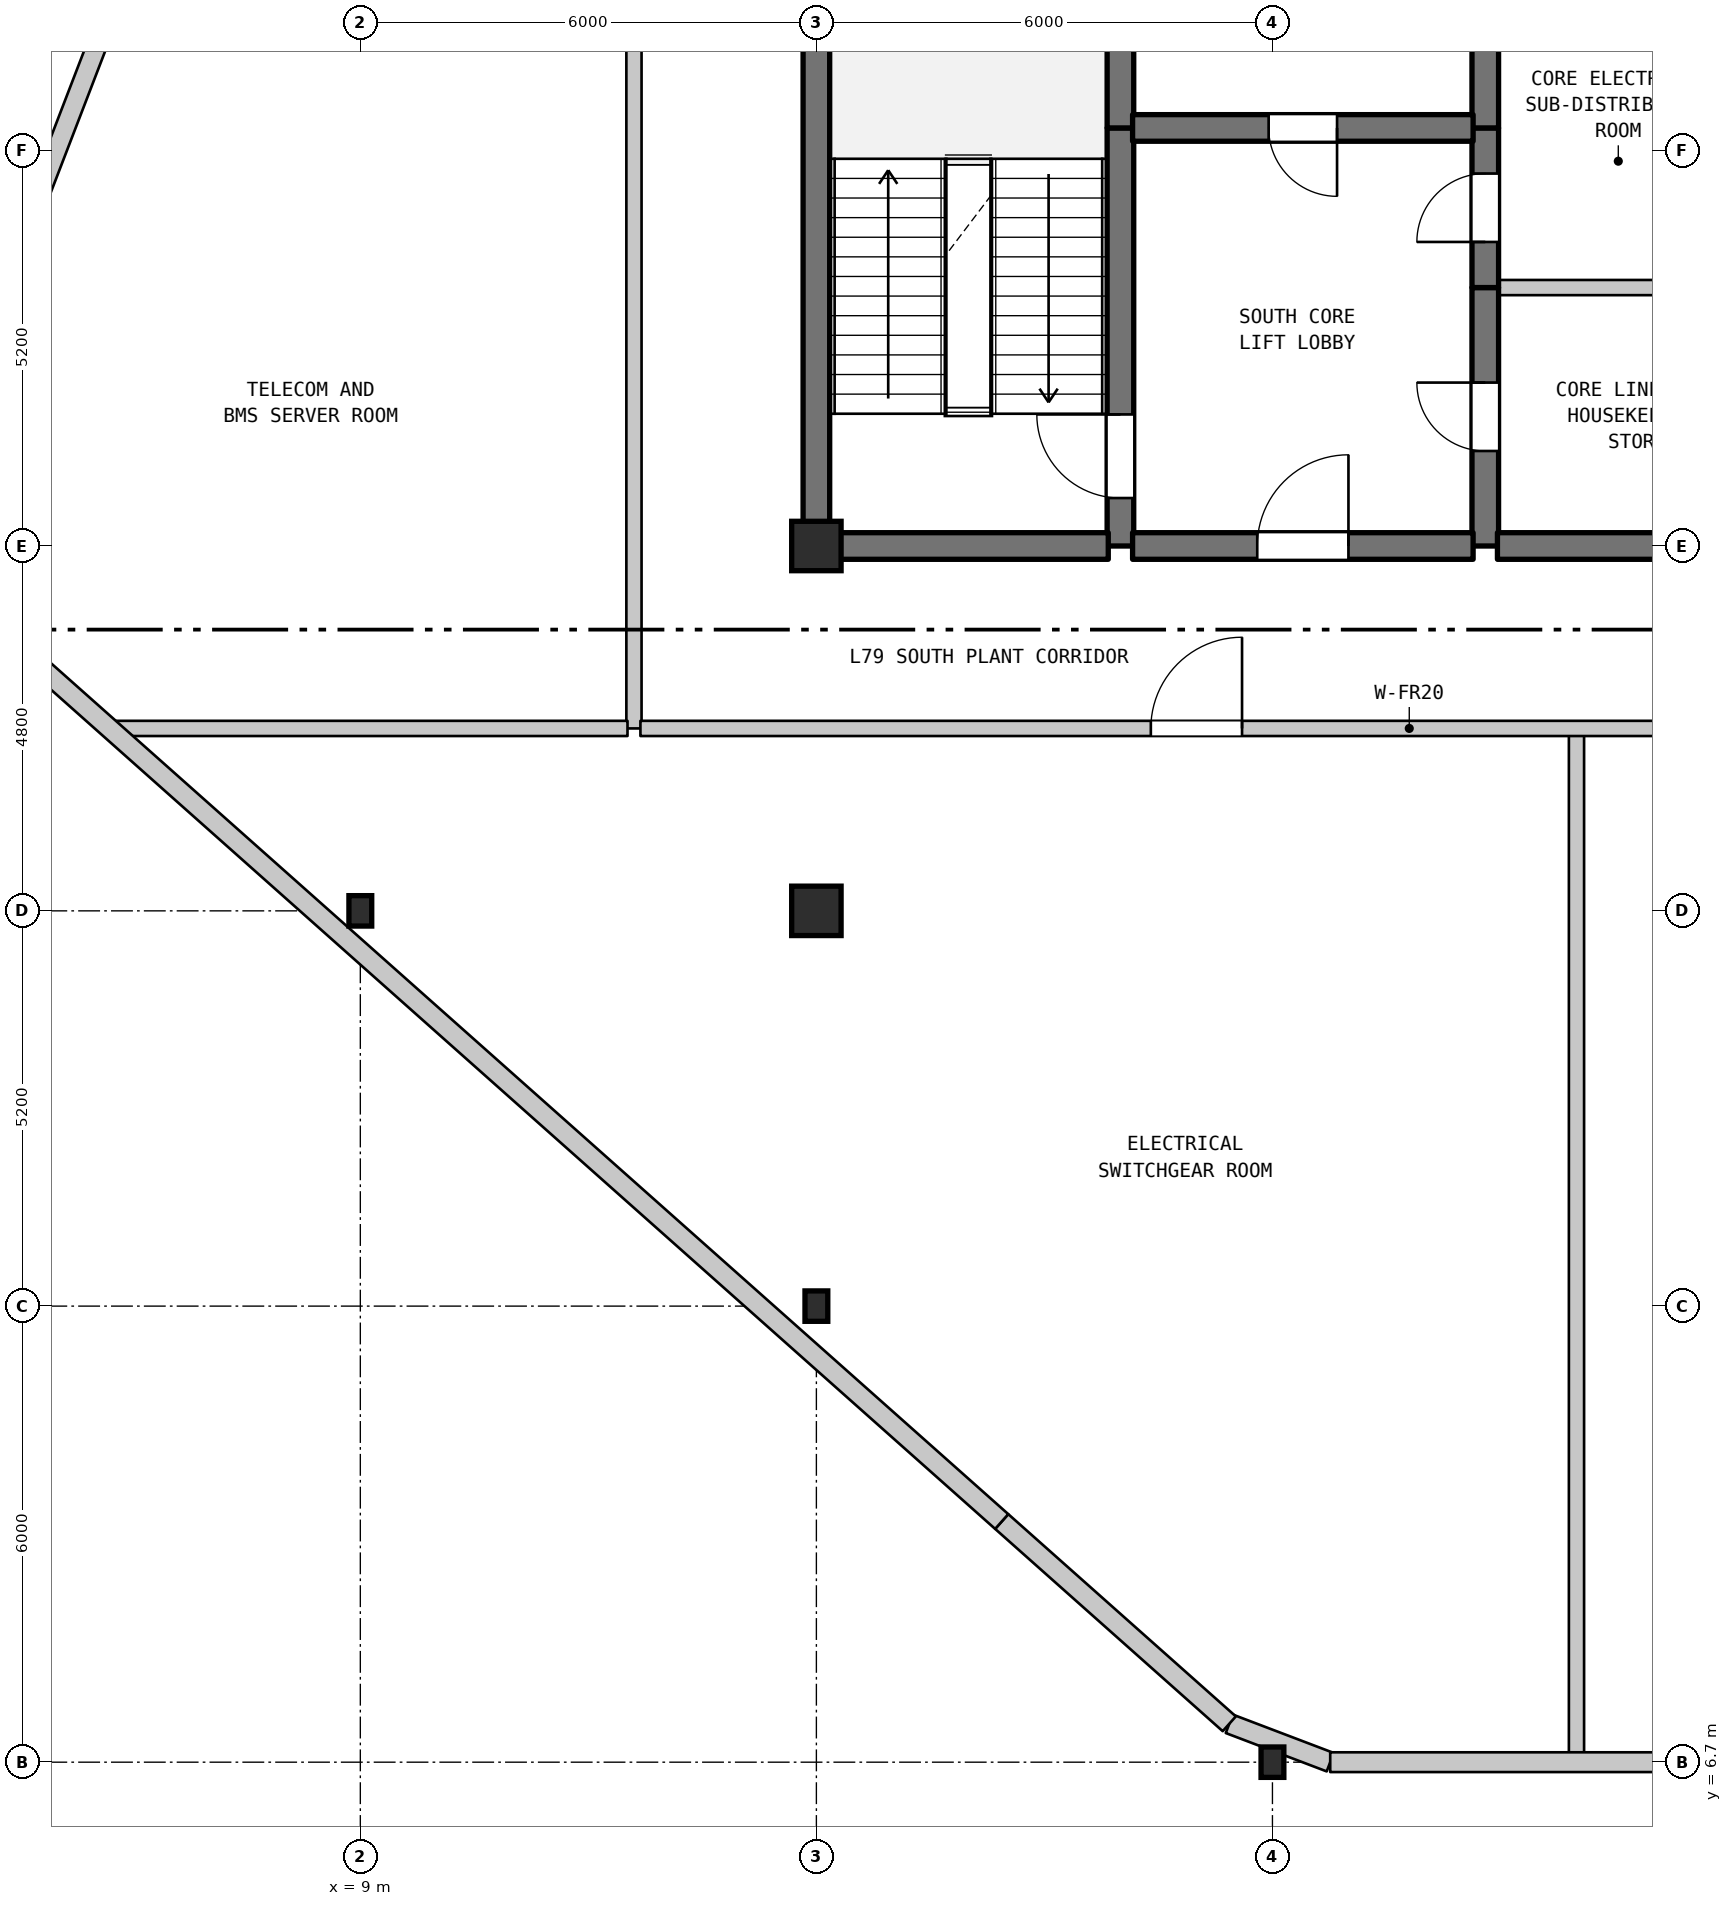
"""IFC4 building model, lengths in metres.
Left out: names, types, materials, properties, quantities, classifications, styles, units other than length and angle.
Written with IfcOpenShell. Run it as: python <this file> out.ifc"""

import sys

from ifc_helpers import new_model, si_unit, direction, frame, frame_2d, origin, origin_2d, place, context, subcontext, project, spatial, rectangle, i_section, extrude, element, fill, save


model = new_model("IFC4")
c1 = context("Model", 3, precision=1e-05, world=origin(), true_north=direction((0.0, 1.0)))
c2 = subcontext(c1, "Body", "Model", "MODEL_VIEW")
j1 = project(units=[si_unit("LENGTHUNIT", "METRE"), si_unit("PLANEANGLEUNIT", "RADIAN")], contexts=[c1])
p1 = place(None, origin())
s1 = spatial("IfcSite", under=j1, at=p1, CompositionType="ELEMENT")
p2 = place(p1, origin())
s2 = spatial("IfcBuilding", under=s1, at=p2, CompositionType="ELEMENT")
p3 = place(p2, frame((0.0, 0.0, 314.7)))
s3 = spatial("IfcBuildingStorey", under=s2, at=p3, CompositionType="ELEMENT", Elevation=314.7)
for number, where, z_axis, x_axis in (
    (1, (9.0, 17.9, 0.0), (0.0, 0.0, 1.0), (1.0, 0.0, 0.0)),
    (2, (15.0, 12.7, 0.0), (0.0, 0.0, 1.0), (1.0, 0.0, 0.0)),
):
    element("IfcColumn", number, at=place(p3, frame(where, z_axis=z_axis, x_axis=x_axis)), inside=s3, PredefinedType="COLUMN", context=c2, shape_type="SweptSolid", body=[
        extrude(i_section(OverallWidth=0.3, OverallDepth=0.4, WebThickness=0.013, FlangeThickness=0.024, FilletRadius=0.027, at=origin_2d()), origin(), (0.0, 0.0, 1.0), 5.3),
    ])
for number, where, z_axis, x_axis in (
    (3, (15.0, 17.9, 0.0), (0.0, 0.0, 1.0), (1.0, 0.0, 0.0)),
    (4, (15.0, 22.7, 0.0), (0.0, 0.0, 1.0), (1.0, 0.0, 0.0)),
):
    element("IfcColumn", number, at=place(p3, frame(where, z_axis=z_axis, x_axis=x_axis)), inside=s3, PredefinedType="COLUMN", context=c2, shape_type="SweptSolid", body=[
        extrude(rectangle(XDim=0.65, YDim=0.65, at=origin_2d()), origin(), (0.0, 0.0, 1.0), 5.3),
    ])
p4 = place(p3, frame((21.0, 6.7, 0.0), z_axis=(0.0, 0.0, 1.0), x_axis=(1.0, 0.0, 0.0)))
e5 = element("IfcColumn", 5, at=p4, inside=s3, PredefinedType="COLUMN", context=c2, shape_type="SweptSolid", body=[
    extrude(i_section(OverallWidth=0.3, OverallDepth=0.4, WebThickness=0.013, FlangeThickness=0.024, FilletRadius=0.027, at=origin_2d()), origin(), (0.0, 0.0, 1.0), 5.3),
])
p5 = place(p3, frame((3.497, 23.993, 0.0), z_axis=(0.0, 0.0, 1.0), x_axis=(0.358990281293, 0.93334129767, 0.0)))
e6 = element("IfcWall", 6, at=p5, inside=s3, PredefinedType="STANDARD", context=c2, shape_type="SweptSolid", body=[
    extrude(rectangle(XDim=30.669, YDim=0.26, at=frame_2d((15.335, 0.0))), origin(), (0.0, 0.0, 1.0), 4.99),
])
p6 = place(p3, frame((21.76, 6.7, 0.0), z_axis=(0.0, 0.0, 1.0), x_axis=(-0.934680848086, 0.355487991671, 0.0)))
e7 = element("IfcWall", 7, at=p6, inside=s3, PredefinedType="STANDARD", context=c2, shape_type="SweptSolid", body=[
    extrude(rectangle(XDim=1.421, YDim=0.26, at=frame_2d((0.71, 0.0))), origin(), (0.0, 0.0, 1.0), 4.99),
])
p7 = place(p3, frame((20.432, 7.205, 0.0), z_axis=(0.0, 0.0, 1.0), x_axis=(-0.747395867011, 0.664378971654, 0.0)))
e8 = element("IfcWall", 8, at=p7, inside=s3, PredefinedType="STANDARD", context=c2, shape_type="SweptSolid", body=[
    extrude(rectangle(XDim=4.005, YDim=0.26, at=frame_2d((2.003, 0.0))), origin(), (0.0, 0.0, 1.0), 4.65),
])
p8 = place(p3, frame((12.6, 20.3, 0.0), z_axis=(0.0, 0.0, 1.0), x_axis=(0.0, 1.0, 0.0)))
e9 = element("IfcWall", 9, at=p8, inside=s3, PredefinedType="STANDARD", context=c2, shape_type="SweptSolid", body=[
    extrude(rectangle(XDim=20.0, YDim=0.2, at=frame_2d((10.0, 0.0))), origin(), (0.0, 0.0, 1.0), 4.99),
])
p9 = place(p8, frame((13.175, 0.0, 0.0)))
e10 = element("IfcOpeningElement", 10, at=p9, cuts=e9, PredefinedType="OPENING", context=c2, shape_type="SweptSolid", body=[
    extrude(rectangle(XDim=1.2, YDim=2.2, at=frame_2d((0.6, 1.1))), frame((0.0, 0.11, 0.0), z_axis=(0.0, -1.0, 0.0), x_axis=(1.0, 0.0, 0.0)), (0.0, 0.0, 1.0), 0.22),
])
p10 = place(p3, frame((15.0, 22.7, 0.0), z_axis=(0.0, 0.0, 1.0), x_axis=(0.0, 1.0, 0.0)))
e11 = element("IfcWall", 11, at=p10, inside=s3, PredefinedType="SHEAR", context=c2, shape_type="SweptSolid", body=[
    extrude(rectangle(XDim=6.8, YDim=0.35, at=frame_2d((3.4, 0.0))), origin(), (0.0, 0.0, 1.0), 4.99),
])
p11 = place(p3, frame((19.0, 22.7, 0.0), z_axis=(0.0, 0.0, 1.0), x_axis=(0.0, 1.0, 0.0)))
e12 = element("IfcWall", 12, at=p11, inside=s3, PredefinedType="SHEAR", context=c2, shape_type="SweptSolid", body=[
    extrude(rectangle(XDim=5.5, YDim=0.35, at=frame_2d((2.75, 0.0))), origin(), (0.0, 0.0, 1.0), 4.99),
])
p12 = place(p11, frame((0.631, 0.0, 0.0)))
e13 = element("IfcOpeningElement", 13, at=p12, cuts=e12, PredefinedType="OPENING", context=c2, shape_type="SweptSolid", body=[
    extrude(rectangle(XDim=1.1, YDim=2.15, at=frame_2d((0.55, 1.075))), frame((0.0, 0.185, 0.0), z_axis=(0.0, -1.0, 0.0), x_axis=(1.0, 0.0, 0.0)), (0.0, 0.0, 1.0), 0.37),
])
p13 = place(p3, frame((19.0, 28.2, 0.0), z_axis=(0.0, 0.0, 1.0), x_axis=(0.0, 1.0, 0.0)))
e14 = element("IfcWall", 14, at=p13, inside=s3, PredefinedType="SHEAR", context=c2, shape_type="SweptSolid", body=[
    extrude(rectangle(XDim=1.3, YDim=0.35, at=frame_2d((0.65, 0.0))), origin(), (0.0, 0.0, 1.0), 4.99),
])
p14 = place(p3, frame((23.8, 22.7, 0.0), z_axis=(0.0, 0.0, 1.0), x_axis=(0.0, 1.0, 0.0)))
e15 = element("IfcWall", 15, at=p14, inside=s3, PredefinedType="SHEAR", context=c2, shape_type="SweptSolid", body=[
    extrude(rectangle(XDim=3.4, YDim=0.35, at=frame_2d((1.7, 0.0))), origin(), (0.0, 0.0, 1.0), 4.99),
])
p15 = place(p14, frame((1.25, 0.0, 0.0)))
e16 = element("IfcOpeningElement", 16, at=p15, cuts=e15, PredefinedType="OPENING", context=c2, shape_type="SweptSolid", body=[
    extrude(rectangle(XDim=0.9, YDim=2.15, at=frame_2d((0.45, 1.075))), frame((0.0, 0.185, 0.0), z_axis=(0.0, -1.0, 0.0), x_axis=(1.0, 0.0, 0.0)), (0.0, 0.0, 1.0), 0.37),
])
p16 = place(p3, frame((23.8, 26.1, 0.0), z_axis=(0.0, 0.0, 1.0), x_axis=(0.0, 1.0, 0.0)))
e17 = element("IfcWall", 17, at=p16, inside=s3, PredefinedType="SHEAR", context=c2, shape_type="SweptSolid", body=[
    extrude(rectangle(XDim=2.1, YDim=0.35, at=frame_2d((1.05, 0.0))), origin(), (0.0, 0.0, 1.0), 4.99),
])
p17 = place(p16, frame((0.6, 0.0, 0.0)))
e18 = element("IfcOpeningElement", 18, at=p17, cuts=e17, PredefinedType="OPENING", context=c2, shape_type="SweptSolid", body=[
    extrude(rectangle(XDim=0.9, YDim=2.15, at=frame_2d((0.45, 1.075))), frame((0.0, 0.185, 0.0), z_axis=(0.0, -1.0, 0.0), x_axis=(1.0, 0.0, 0.0)), (0.0, 0.0, 1.0), 0.37),
])
p18 = place(p3, frame((23.8, 28.2, 0.0), z_axis=(0.0, 0.0, 1.0), x_axis=(0.0, 1.0, 0.0)))
e19 = element("IfcWall", 19, at=p18, inside=s3, PredefinedType="SHEAR", context=c2, shape_type="SweptSolid", body=[
    extrude(rectangle(XDim=2.6, YDim=0.35, at=frame_2d((1.3, 0.0))), origin(), (0.0, 0.0, 1.0), 4.99),
])
p19 = place(p3, frame((25.0, 6.71, 0.0), z_axis=(0.0, 0.0, 1.0), x_axis=(0.0, 1.0, 0.0)))
e20 = element("IfcWall", 20, at=p19, inside=s3, PredefinedType="STANDARD", context=c2, shape_type="SweptSolid", body=[
    extrude(rectangle(XDim=13.59, YDim=0.2, at=frame_2d((6.795, 0.0))), origin(), (0.0, 0.0, 1.0), 4.99),
])
p20 = place(p3, frame((5.71, 20.3, 0.0), z_axis=(0.0, 0.0, 1.0), x_axis=(1.0, 0.0, 0.0)))
e21 = element("IfcWall", 21, at=p20, inside=s3, PredefinedType="STANDARD", context=c2, shape_type="SweptSolid", body=[
    extrude(rectangle(XDim=6.805, YDim=0.2, at=frame_2d((3.402, 0.0))), origin(), (0.0, 0.0, 1.0), 4.99),
])
p21 = place(p3, frame((12.685, 20.3, 0.0), z_axis=(0.0, 0.0, 1.0), x_axis=(1.0, 0.0, 0.0)))
e22 = element("IfcWall", 22, at=p21, inside=s3, PredefinedType="STANDARD", context=c2, shape_type="SweptSolid", body=[
    extrude(rectangle(XDim=20.23, YDim=0.2, at=frame_2d((10.115, 0.0))), origin(), (0.0, 0.0, 1.0), 4.99),
])
p22 = place(p21, frame((6.715, 0.0, 0.0)))
e23 = element("IfcOpeningElement", 23, at=p22, cuts=e22, PredefinedType="OPENING", context=c2, shape_type="SweptSolid", body=[
    extrude(rectangle(XDim=1.2, YDim=2.2, at=frame_2d((0.6, 1.1))), frame((0.0, 0.11, 0.0), z_axis=(0.0, -1.0, 0.0), x_axis=(1.0, 0.0, 0.0)), (0.0, 0.0, 1.0), 0.22),
])
p23 = place(p21, frame((16.14, 0.0, 0.0)))
e24 = element("IfcOpeningElement", 24, at=p23, cuts=e22, PredefinedType="OPENING", context=c2, shape_type="SweptSolid", body=[
    extrude(rectangle(XDim=1.2, YDim=2.2, at=frame_2d((0.6, 1.1))), frame((0.0, 0.11, 0.0), z_axis=(0.0, -1.0, 0.0), x_axis=(1.0, 0.0, 0.0)), (0.0, 0.0, 1.0), 0.22),
])
p24 = place(p3, frame((15.16, 22.7, 0.0), z_axis=(0.0, 0.0, 1.0), x_axis=(1.0, 0.0, 0.0)))
e25 = element("IfcWall", 25, at=p24, inside=s3, PredefinedType="SHEAR", context=c2, shape_type="SweptSolid", body=[
    extrude(rectangle(XDim=3.68, YDim=0.35, at=frame_2d((1.84, 0.0))), origin(), (0.0, 0.0, 1.0), 4.99),
])
p25 = place(p3, frame((19.16, 22.7, 0.0), z_axis=(0.0, 0.0, 1.0), x_axis=(1.0, 0.0, 0.0)))
e26 = element("IfcWall", 26, at=p25, inside=s3, PredefinedType="SHEAR", context=c2, shape_type="SweptSolid", body=[
    extrude(rectangle(XDim=4.48, YDim=0.35, at=frame_2d((2.24, 0.0))), origin(), (0.0, 0.0, 1.0), 4.99),
])
p26 = place(p25, frame((1.64, 0.0, 0.0)))
e27 = element("IfcOpeningElement", 27, at=p26, cuts=e26, PredefinedType="OPENING", context=c2, shape_type="SweptSolid", body=[
    extrude(rectangle(XDim=1.2, YDim=2.2, at=frame_2d((0.6, 1.1))), frame((0.0, 0.185, 0.0), z_axis=(0.0, -1.0, 0.0), x_axis=(1.0, 0.0, 0.0)), (0.0, 0.0, 1.0), 0.37),
])
p27 = place(p3, frame((23.96, 22.7, 0.0), z_axis=(0.0, 0.0, 1.0), x_axis=(1.0, 0.0, 0.0)))
e28 = element("IfcWall", 28, at=p27, inside=s3, PredefinedType="SHEAR", context=c2, shape_type="SweptSolid", body=[
    extrude(rectangle(XDim=3.18, YDim=0.35, at=frame_2d((1.59, 0.0))), origin(), (0.0, 0.0, 1.0), 4.99),
])
p28 = place(p3, frame((23.96, 26.1, 0.0), z_axis=(0.0, 0.0, 1.0), x_axis=(1.0, 0.0, 0.0)))
e29 = element("IfcWall", 29, at=p28, inside=s3, PredefinedType="STANDARD", context=c2, shape_type="SweptSolid", body=[
    extrude(rectangle(XDim=3.18, YDim=0.2, at=frame_2d((1.59, 0.0))), origin(), (0.0, 0.0, 1.0), 4.99),
])
p29 = place(p3, frame((19.16, 28.2, 0.0), z_axis=(0.0, 0.0, 1.0), x_axis=(1.0, 0.0, 0.0)))
e30 = element("IfcWall", 30, at=p29, inside=s3, PredefinedType="SHEAR", context=c2, shape_type="SweptSolid", body=[
    extrude(rectangle(XDim=4.48, YDim=0.35, at=frame_2d((2.24, 0.0))), origin(), (0.0, 0.0, 1.0), 4.99),
])
p30 = place(p29, frame((1.79, 0.0, 0.0)))
e31 = element("IfcOpeningElement", 31, at=p30, cuts=e30, PredefinedType="OPENING", context=c2, shape_type="SweptSolid", body=[
    extrude(rectangle(XDim=0.9, YDim=2.15, at=frame_2d((0.45, 1.075))), frame((0.0, 0.185, 0.0), z_axis=(0.0, -1.0, 0.0), x_axis=(1.0, 0.0, 0.0)), (0.0, 0.0, 1.0), 0.37),
])
p31 = place(p3, frame((39.0, 6.7, 0.0), z_axis=(0.0, 0.0, 1.0), x_axis=(-1.0, 0.0, 0.0)))
e32 = element("IfcWall", 32, at=p31, inside=s3, PredefinedType="STANDARD", context=c2, shape_type="SweptSolid", body=[
    extrude(rectangle(XDim=17.24, YDim=0.26, at=frame_2d((8.62, 0.0))), origin(), (0.0, 0.0, 1.0), 4.64),
])
p32 = place(p3, frame((17.438, 9.866, 0.0), z_axis=(0.0, 0.0, 1.0), x_axis=(-0.747416078768, 0.664356233657, 0.0)))
e33 = element("IfcWall", 33, at=p32, inside=s3, PredefinedType="STANDARD", context=c2, shape_type="SweptSolid", body=[
    extrude(rectangle(XDim=17.933, YDim=0.26, at=frame_2d((8.966, 0.0))), origin(), (0.0, 0.0, 1.0), 4.99),
])
p33 = place(p12, origin())
e34 = element("IfcDoor", 34, at=p33, inside=s3, OperationType="SINGLE_SWING_RIGHT", PredefinedType="DOOR", context=c2, shape_type="SweptSolid", body=[
    extrude(rectangle(XDim=1.1, YDim=2.15, at=frame_2d((0.55, 1.075))), frame((0.0, 0.025, 0.0), z_axis=(0.0, -1.0, 0.0), x_axis=(1.0, 0.0, 0.0)), (0.0, 0.0, 1.0), 0.05),
])
fill(e13, e34)
p34 = place(p15, origin())
e35 = element("IfcDoor", 35, at=p34, inside=s3, OperationType="SINGLE_SWING_RIGHT", PredefinedType="DOOR", context=c2, shape_type="SweptSolid", body=[
    extrude(rectangle(XDim=0.9, YDim=2.15, at=frame_2d((0.45, 1.075))), frame((0.0, 0.025, 0.0), z_axis=(0.0, -1.0, 0.0), x_axis=(1.0, 0.0, 0.0)), (0.0, 0.0, 1.0), 0.05),
])
fill(e16, e35)
p35 = place(p17, origin())
e36 = element("IfcDoor", 36, at=p35, inside=s3, OperationType="SINGLE_SWING_LEFT", PredefinedType="DOOR", context=c2, shape_type="SweptSolid", body=[
    extrude(rectangle(XDim=0.9, YDim=2.15, at=frame_2d((0.45, 1.075))), frame((0.0, 0.025, 0.0), z_axis=(0.0, -1.0, 0.0), x_axis=(1.0, 0.0, 0.0)), (0.0, 0.0, 1.0), 0.05),
])
fill(e18, e36)
p36 = place(p22, origin())
e37 = element("IfcDoor", 37, at=p36, inside=s3, OperationType="SINGLE_SWING_RIGHT", PredefinedType="DOOR", context=c2, shape_type="SweptSolid", body=[
    extrude(rectangle(XDim=1.2, YDim=2.2, at=frame_2d((0.6, 1.1))), frame((0.0, 0.025, 0.0), z_axis=(0.0, -1.0, 0.0), x_axis=(1.0, 0.0, 0.0)), (0.0, 0.0, 1.0), 0.05),
])
fill(e23, e37)
p37 = place(p26, origin())
e38 = element("IfcDoor", 38, at=p37, inside=s3, OperationType="SINGLE_SWING_RIGHT", PredefinedType="DOOR", context=c2, shape_type="SweptSolid", body=[
    extrude(rectangle(XDim=1.2, YDim=2.2, at=frame_2d((0.6, 1.1))), frame((0.0, 0.025, 0.0), z_axis=(0.0, -1.0, 0.0), x_axis=(1.0, 0.0, 0.0)), (0.0, 0.0, 1.0), 0.05),
])
fill(e27, e38)
p38 = place(p30, frame((0.9, 0.0, 0.0), z_axis=(0.0, 0.0, 1.0), x_axis=(-1.0, 0.0, 0.0)))
e39 = element("IfcDoor", 39, at=p38, inside=s3, OperationType="SINGLE_SWING_RIGHT", PredefinedType="DOOR", context=c2, shape_type="SweptSolid", body=[
    extrude(rectangle(XDim=0.9, YDim=2.15, at=frame_2d((0.45, 1.075))), frame((0.0, 0.025, 0.0), z_axis=(0.0, -1.0, 0.0), x_axis=(1.0, 0.0, 0.0)), (0.0, 0.0, 1.0), 0.05),
])
fill(e31, e39)
save(model, sys.argv[1])
